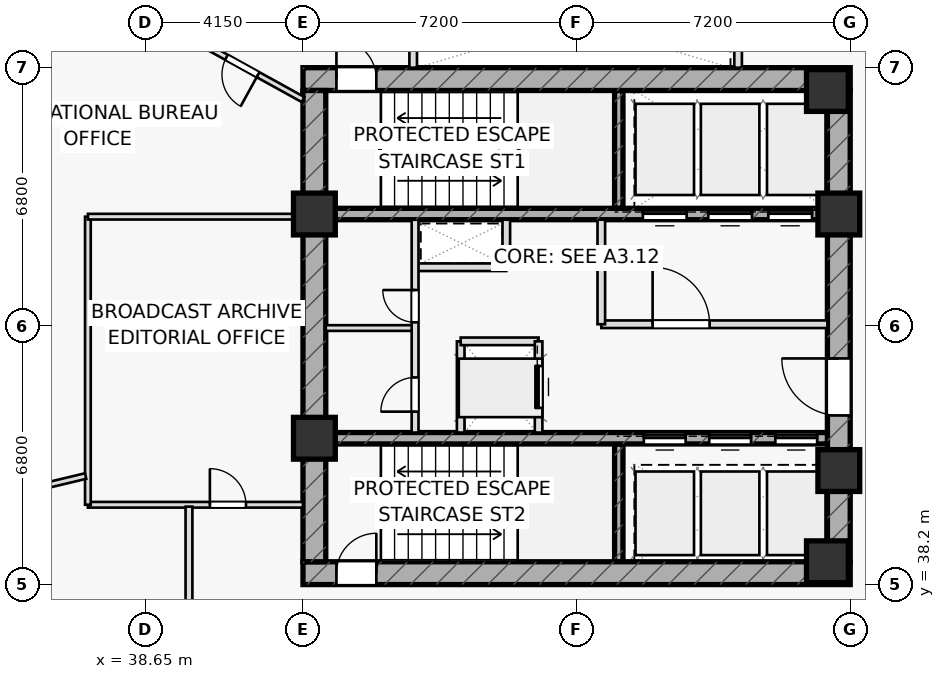
"""IFC4 building model, lengths in metres.
Left out: names, types, materials, properties, quantities, classifications, styles, units other than length and angle.
Written with IfcOpenShell. Run it as: python <this file> out.ifc"""

import sys

from ifc_helpers import new_model, si_unit, direction, frame, frame_2d, origin, origin_2d, place, context, subcontext, project, spatial, rectangle, extrude, element, fill, save


model = new_model("IFC4")
c1 = context("Model", 3, precision=1e-05, world=origin(), true_north=direction((0.0, 1.0)))
c2 = subcontext(c1, "Body", "Model", "MODEL_VIEW")
j1 = project(units=[si_unit("LENGTHUNIT", "METRE"), si_unit("PLANEANGLEUNIT", "RADIAN")], contexts=[c1])
p1 = place(None, origin())
s1 = spatial("IfcSite", under=j1, at=p1, CompositionType="ELEMENT")
p2 = place(p1, origin())
s2 = spatial("IfcBuilding", under=s1, at=p2, CompositionType="ELEMENT")
p3 = place(p2, frame((0.0, 0.0, 127.15)))
s3 = spatial("IfcBuildingStorey", under=s2, at=p3, CompositionType="ELEMENT", Elevation=127.15)
for number, where, z_axis, x_axis in (
    (1, (51.11, 48.1, 0.0), (0.0, 0.0, 1.0), (0.0, 1.0, 0.0)),
    (2, (51.11, 38.8, 0.0), (0.0, 0.0, 1.0), (0.0, 1.0, 0.0)),
):
    element("IfcWall", number, at=place(p3, frame(where, z_axis=z_axis, x_axis=x_axis)), inside=s3, PredefinedType="SHEAR", context=c2, shape_type="SweptSolid", body=[
        extrude(rectangle(XDim=3.1, YDim=0.22, at=frame_2d((1.55, 0.0))), origin(), (0.0, 0.0, 1.0), 3.55),
    ])
p4 = place(p3, frame((42.8, 51.5, 0.0), z_axis=(0.0, 0.0, 1.0), x_axis=(1.0, 0.0, 0.0)))
e3 = element("IfcWall", 3, at=p4, inside=s3, PredefinedType="SHEAR", context=c2, shape_type="SweptSolid", body=[
    extrude(rectangle(XDim=14.4, YDim=0.6, at=frame_2d((7.2, 0.0))), origin(), (0.0, 0.0, 1.0), 3.55),
])
p5 = place(p4, frame((0.88, 0.0, 0.0)))
e4 = element("IfcOpeningElement", 4, at=p5, cuts=e3, PredefinedType="OPENING", context=c2, shape_type="SweptSolid", body=[
    extrude(rectangle(XDim=1.05, YDim=2.2, at=frame_2d((0.525, 1.1))), frame((0.0, 0.31, 0.0), z_axis=(0.0, -1.0, 0.0), x_axis=(1.0, 0.0, 0.0)), (0.0, 0.0, 1.0), 0.62),
])
p6 = place(p3, frame((42.8, 38.5, 0.0), z_axis=(0.0, 0.0, 1.0), x_axis=(1.0, 0.0, 0.0)))
e5 = element("IfcWall", 5, at=p6, inside=s3, PredefinedType="SHEAR", context=c2, shape_type="SweptSolid", body=[
    extrude(rectangle(XDim=14.4, YDim=0.6, at=frame_2d((7.2, 0.0))), origin(), (0.0, 0.0, 1.0), 3.55),
])
p7 = place(p6, frame((0.88, 0.0, 0.0)))
e6 = element("IfcOpeningElement", 6, at=p7, cuts=e5, PredefinedType="OPENING", context=c2, shape_type="SweptSolid", body=[
    extrude(rectangle(XDim=1.05, YDim=2.2, at=frame_2d((0.525, 1.1))), frame((0.0, 0.31, 0.0), z_axis=(0.0, -1.0, 0.0), x_axis=(1.0, 0.0, 0.0)), (0.0, 0.0, 1.0), 0.62),
])
p8 = place(p3, frame((43.1, 38.8, 0.0), z_axis=(0.0, 0.0, 1.0), x_axis=(0.0, 1.0, 0.0)))
e7 = element("IfcWall", 7, at=p8, inside=s3, PredefinedType="SHEAR", context=c2, shape_type="SweptSolid", body=[
    extrude(rectangle(XDim=12.4, YDim=0.6, at=frame_2d((6.2, 0.0))), origin(), (0.0, 0.0, 1.0), 3.55),
])
p9 = place(p3, frame((56.9, 38.8, 0.0), z_axis=(0.0, 0.0, 1.0), x_axis=(0.0, 1.0, 0.0)))
e8 = element("IfcWall", 8, at=p9, inside=s3, PredefinedType="SHEAR", context=c2, shape_type="SweptSolid", body=[
    extrude(rectangle(XDim=12.4, YDim=0.6, at=frame_2d((6.2, 0.0))), origin(), (0.0, 0.0, 1.0), 3.55),
])
p10 = place(p9, frame((3.85, 0.0, 0.0)))
e9 = element("IfcOpeningElement", 9, at=p10, cuts=e8, PredefinedType="OPENING", context=c2, shape_type="SweptSolid", body=[
    extrude(rectangle(XDim=1.5, YDim=2.2, at=frame_2d((0.75, 1.1))), frame((0.0, 0.31, 0.0), z_axis=(0.0, -1.0, 0.0), x_axis=(1.0, 0.0, 0.0)), (0.0, 0.0, 1.0), 0.62),
])
p11 = place(p3, frame((43.4, 47.95, 0.0), z_axis=(0.0, 0.0, 1.0), x_axis=(1.0, 0.0, 0.0)))
e10 = element("IfcWall", 10, at=p11, inside=s3, PredefinedType="SHEAR", context=c2, shape_type="SweptSolid", body=[
    extrude(rectangle(XDim=13.2, YDim=0.3, at=frame_2d((6.6, 0.0))), origin(), (0.0, 0.0, 1.0), 3.55),
])
p12 = place(p11, frame((8.345, 0.0, 0.0)))
e11 = element("IfcOpeningElement", 11, at=p12, cuts=e10, PredefinedType="OPENING", context=c2, shape_type="SweptSolid", body=[
    extrude(rectangle(XDim=1.15, YDim=2.2, at=frame_2d((0.575, 1.1))), frame((0.0, 0.16, 0.0), z_axis=(0.0, -1.0, 0.0), x_axis=(1.0, 0.0, 0.0)), (0.0, 0.0, 1.0), 0.32),
])
p13 = place(p11, frame((10.065, 0.0, 0.0)))
e12 = element("IfcOpeningElement", 12, at=p13, cuts=e10, PredefinedType="OPENING", context=c2, shape_type="SweptSolid", body=[
    extrude(rectangle(XDim=1.15, YDim=2.2, at=frame_2d((0.575, 1.1))), frame((0.0, 0.16, 0.0), z_axis=(0.0, -1.0, 0.0), x_axis=(1.0, 0.0, 0.0)), (0.0, 0.0, 1.0), 0.32),
])
p14 = place(p11, frame((11.645, 0.0, 0.0)))
e13 = element("IfcOpeningElement", 13, at=p14, cuts=e10, PredefinedType="OPENING", context=c2, shape_type="SweptSolid", body=[
    extrude(rectangle(XDim=1.15, YDim=2.2, at=frame_2d((0.575, 1.1))), frame((0.0, 0.16, 0.0), z_axis=(0.0, -1.0, 0.0), x_axis=(1.0, 0.0, 0.0)), (0.0, 0.0, 1.0), 0.32),
])
p15 = place(p3, frame((43.4, 42.05, 0.0), z_axis=(0.0, 0.0, 1.0), x_axis=(1.0, 0.0, 0.0)))
e14 = element("IfcWall", 14, at=p15, inside=s3, PredefinedType="SHEAR", context=c2, shape_type="SweptSolid", body=[
    extrude(rectangle(XDim=13.2, YDim=0.3, at=frame_2d((6.6, 0.0))), origin(), (0.0, 0.0, 1.0), 3.55),
])
p16 = place(p15, frame((8.37, 0.0, 0.0)))
e15 = element("IfcOpeningElement", 15, at=p16, cuts=e14, PredefinedType="OPENING", context=c2, shape_type="SweptSolid", body=[
    extrude(rectangle(XDim=1.1, YDim=2.15, at=frame_2d((0.55, 1.075))), frame((0.0, 0.16, 0.0), z_axis=(0.0, -1.0, 0.0), x_axis=(1.0, 0.0, 0.0)), (0.0, 0.0, 1.0), 0.32),
])
p17 = place(p15, frame((10.09, 0.0, 0.0)))
e16 = element("IfcOpeningElement", 16, at=p17, cuts=e14, PredefinedType="OPENING", context=c2, shape_type="SweptSolid", body=[
    extrude(rectangle(XDim=1.1, YDim=2.15, at=frame_2d((0.55, 1.075))), frame((0.0, 0.16, 0.0), z_axis=(0.0, -1.0, 0.0), x_axis=(1.0, 0.0, 0.0)), (0.0, 0.0, 1.0), 0.32),
])
p18 = place(p15, frame((11.83, 0.0, 0.0)))
e17 = element("IfcOpeningElement", 17, at=p18, cuts=e14, PredefinedType="OPENING", context=c2, shape_type="SweptSolid", body=[
    extrude(rectangle(XDim=1.1, YDim=2.15, at=frame_2d((0.55, 1.075))), frame((0.0, 0.16, 0.0), z_axis=(0.0, -1.0, 0.0), x_axis=(1.0, 0.0, 0.0)), (0.0, 0.0, 1.0), 0.32),
])
for number, where, z_axis, x_axis in (
    (18, (43.1, 47.95, 0.0), (0.0, 0.0, 1.0), (1.0, 0.0, 0.0)),
    (19, (56.9, 47.95, 0.0), (0.0, 0.0, 1.0), (1.0, 0.0, 0.0)),
    (20, (56.6, 51.2, 0.0), (0.0, 0.0, 1.0), (1.0, 0.0, 0.0)),
    (21, (43.1, 42.05, 0.0), (0.0, 0.0, 1.0), (1.0, 0.0, 0.0)),
    (22, (56.9, 41.2, 0.0), (0.0, 0.0, 1.0), (1.0, 0.0, 0.0)),
    (23, (56.6, 38.8, 0.0), (0.0, 0.0, 1.0), (1.0, 0.0, 0.0)),
):
    element("IfcColumn", number, at=place(p3, frame(where, z_axis=z_axis, x_axis=x_axis)), inside=s3, PredefinedType="COLUMN", context=c2, shape_type="SweptSolid", body=[
        extrude(rectangle(XDim=1.1, YDim=1.1, at=origin_2d()), origin(), (0.0, 0.0, 1.0), 3.55),
    ])
for number, where, z_axis, x_axis in (
    (24, (45.7, 51.8, 0.0), (0.0, 0.0, 1.0), (0.0, 1.0, 0.0)),
    (25, (54.25, 51.8, 0.0), (0.0, 0.0, 1.0), (0.0, 1.0, 0.0)),
):
    element("IfcWall", number, at=place(p3, frame(where, z_axis=z_axis, x_axis=x_axis)), inside=s3, PredefinedType="PARTITIONING", context=c2, shape_type="SweptSolid", body=[
        extrude(rectangle(XDim=2.5, YDim=0.2, at=frame_2d((1.25, 0.0))), origin(), (0.0, 0.0, 1.0), 3.55),
    ])
p19 = place(p3, frame((45.75, 46.55, 0.0), z_axis=(0.0, 0.0, 1.0), x_axis=(1.0, 0.0, 0.0)))
e26 = element("IfcWall", 26, at=p19, inside=s3, PredefinedType="PARTITIONING", context=c2, shape_type="SweptSolid", body=[
    extrude(rectangle(XDim=2.4, YDim=0.2, at=frame_2d((1.2, 0.0))), origin(), (0.0, 0.0, 1.0), 3.55),
])
p20 = place(p3, frame((48.15, 46.55, 0.0), z_axis=(0.0, 0.0, 1.0), x_axis=(0.0, 1.0, 0.0)))
e27 = element("IfcWall", 27, at=p20, inside=s3, PredefinedType="PARTITIONING", context=c2, shape_type="SweptSolid", body=[
    extrude(rectangle(XDim=1.25, YDim=0.2, at=frame_2d((0.625, 0.0))), origin(), (0.0, 0.0, 1.0), 3.55),
])
p21 = place(p3, frame((46.95, 42.2, 0.0), z_axis=(0.0, 0.0, 1.0), x_axis=(0.0, 1.0, 0.0)))
e28 = element("IfcWall", 28, at=p21, inside=s3, PredefinedType="PARTITIONING", context=c2, shape_type="SweptSolid", body=[
    extrude(rectangle(XDim=2.4, YDim=0.2, at=frame_2d((1.2, 0.0))), origin(), (0.0, 0.0, 1.0), 3.55),
])
p22 = place(p3, frame((46.95, 44.6, 0.0), z_axis=(0.0, 0.0, 1.0), x_axis=(1.0, 0.0, 0.0)))
e29 = element("IfcWall", 29, at=p22, inside=s3, PredefinedType="PARTITIONING", context=c2, shape_type="SweptSolid", body=[
    extrude(rectangle(XDim=2.05, YDim=0.2, at=frame_2d((1.025, 0.0))), origin(), (0.0, 0.0, 1.0), 3.55),
])
p23 = place(p3, frame((50.65, 45.05, 0.0), z_axis=(0.0, 0.0, 1.0), x_axis=(1.0, 0.0, 0.0)))
e30 = element("IfcWall", 30, at=p23, inside=s3, PredefinedType="PARTITIONING", context=c2, shape_type="SweptSolid", body=[
    extrude(rectangle(XDim=5.95, YDim=0.2, at=frame_2d((2.975, 0.0))), origin(), (0.0, 0.0, 1.0), 3.55),
])
p24 = place(p23, frame((1.35, 0.0, 0.0)))
e31 = element("IfcOpeningElement", 31, at=p24, cuts=e30, PredefinedType="OPENING", context=c2, shape_type="SweptSolid", body=[
    extrude(rectangle(XDim=1.5, YDim=2.2, at=frame_2d((0.75, 1.1))), frame((0.0, 0.11, 0.0), z_axis=(0.0, -1.0, 0.0), x_axis=(1.0, 0.0, 0.0)), (0.0, 0.0, 1.0), 0.22),
])
p25 = place(p3, frame((50.65, 45.05, 0.0), z_axis=(0.0, 0.0, 1.0), x_axis=(0.0, 1.0, 0.0)))
e32 = element("IfcWall", 32, at=p25, inside=s3, PredefinedType="PARTITIONING", context=c2, shape_type="SweptSolid", body=[
    extrude(rectangle(XDim=2.75, YDim=0.2, at=frame_2d((1.375, 0.0))), origin(), (0.0, 0.0, 1.0), 3.55),
])
p26 = place(p3, frame((43.4, 44.95, 0.0), z_axis=(0.0, 0.0, 1.0), x_axis=(1.0, 0.0, 0.0)))
e33 = element("IfcWall", 33, at=p26, inside=s3, PredefinedType="PARTITIONING", context=c2, shape_type="SweptSolid", body=[
    extrude(rectangle(XDim=2.35, YDim=0.15, at=frame_2d((1.175, 0.0))), origin(), (0.0, 0.0, 1.0), 3.55),
])
p27 = place(p3, frame((45.75, 42.2, 0.0), z_axis=(0.0, 0.0, 1.0), x_axis=(0.0, 1.0, 0.0)))
e34 = element("IfcWall", 34, at=p27, inside=s3, PredefinedType="PARTITIONING", context=c2, shape_type="SweptSolid", body=[
    extrude(rectangle(XDim=5.6, YDim=0.18, at=frame_2d((2.8, 0.0))), origin(), (0.0, 0.0, 1.0), 3.55),
])
p28 = place(p27, frame((0.55, 0.0, 0.0)))
e35 = element("IfcOpeningElement", 35, at=p28, cuts=e34, PredefinedType="OPENING", context=c2, shape_type="SweptSolid", body=[
    extrude(rectangle(XDim=0.9, YDim=2.05, at=frame_2d((0.45, 1.025))), frame((0.0, 0.1, 0.0), z_axis=(0.0, -1.0, 0.0), x_axis=(1.0, 0.0, 0.0)), (0.0, 0.0, 1.0), 0.2),
])
p29 = place(p27, frame((2.9, 0.0, 0.0)))
e36 = element("IfcOpeningElement", 36, at=p29, cuts=e34, PredefinedType="OPENING", context=c2, shape_type="SweptSolid", body=[
    extrude(rectangle(XDim=0.85, YDim=2.05, at=frame_2d((0.425, 1.025))), frame((0.0, 0.1, 0.0), z_axis=(0.0, -1.0, 0.0), x_axis=(1.0, 0.0, 0.0)), (0.0, 0.0, 1.0), 0.2),
])
p30 = place(p3, frame((37.14, 40.3, 0.0), z_axis=(0.0, 0.0, 1.0), x_axis=(1.0, 0.0, 0.0)))
e37 = element("IfcWall", 37, at=p30, inside=s3, PredefinedType="PARTITIONING", context=c2, shape_type="SweptSolid", body=[
    extrude(rectangle(XDim=5.66, YDim=0.15, at=frame_2d((2.83, 0.0))), origin(), (0.0, 0.0, 1.0), 3.55),
])
p31 = place(p30, frame((3.21, 0.0, 0.0)))
e38 = element("IfcOpeningElement", 38, at=p31, cuts=e37, PredefinedType="OPENING", context=c2, shape_type="SweptSolid", body=[
    extrude(rectangle(XDim=0.95, YDim=2.05, at=frame_2d((0.475, 1.025))), frame((0.0, 0.085, 0.0), z_axis=(0.0, -1.0, 0.0), x_axis=(1.0, 0.0, 0.0)), (0.0, 0.0, 1.0), 0.17),
])
p32 = place(p3, frame((37.14, 40.3, 0.0), z_axis=(0.0, 0.0, 1.0), x_axis=(0.0, 1.0, 0.0)))
e39 = element("IfcWall", 39, at=p32, inside=s3, PredefinedType="PARTITIONING", context=c2, shape_type="SweptSolid", body=[
    extrude(rectangle(XDim=7.58, YDim=0.15, at=frame_2d((3.79, 0.0))), origin(), (0.0, 0.0, 1.0), 2.835),
])
p33 = place(p3, frame((37.14, 47.88, 0.0), z_axis=(0.0, 0.0, 1.0), x_axis=(1.0, 0.0, 0.0)))
e40 = element("IfcWall", 40, at=p33, inside=s3, PredefinedType="PARTITIONING", context=c2, shape_type="SweptSolid", body=[
    extrude(rectangle(XDim=5.66, YDim=0.15, at=frame_2d((2.83, 0.0))), origin(), (0.0, 0.0, 1.0), 2.835),
])
p34 = place(p3, frame((42.8, 50.963, 0.0), z_axis=(0.0, 0.0, 1.0), x_axis=(-0.875434937419, 0.483335980811, 0.0)))
e41 = element("IfcWall", 41, at=p34, inside=s3, PredefinedType="PARTITIONING", context=c2, shape_type="SweptSolid", body=[
    extrude(rectangle(XDim=12.526, YDim=0.15, at=frame_2d((6.263, 0.0))), origin(), (0.0, 0.0, 1.0), 2.835),
])
p35 = place(p34, frame((1.35, 0.0, 0.0)))
e42 = element("IfcOpeningElement", 42, at=p35, cuts=e41, PredefinedType="OPENING", context=c2, shape_type="SweptSolid", body=[
    extrude(rectangle(XDim=0.95, YDim=2.05, at=frame_2d((0.475, 1.025))), frame((0.0, 0.085, 0.0), z_axis=(0.0, -1.0, 0.0), x_axis=(1.0, 0.0, 0.0)), (0.0, 0.0, 1.0), 0.17),
])
p36 = place(p3, frame((37.08, 41.055, 0.0), z_axis=(0.0, 0.0, 1.0), x_axis=(-0.972658265099, -0.232241037146, 0.0)))
e43 = element("IfcWall", 43, at=p36, inside=s3, PredefinedType="PARTITIONING", context=c2, shape_type="SweptSolid", body=[
    extrude(rectangle(XDim=7.89, YDim=0.15, at=frame_2d((3.945, 0.0))), origin(), (0.0, 0.0, 1.0), 2.975),
])
p37 = place(p36, frame((1.35, 0.0, 0.0)))
e44 = element("IfcOpeningElement", 44, at=p37, cuts=e43, PredefinedType="OPENING", context=c2, shape_type="SweptSolid", body=[
    extrude(rectangle(XDim=0.95, YDim=2.05, at=frame_2d((0.475, 1.025))), frame((0.0, 0.085, 0.0), z_axis=(0.0, -1.0, 0.0), x_axis=(1.0, 0.0, 0.0)), (0.0, 0.0, 1.0), 0.17),
])
p38 = place(p3, frame((39.8, 35.95, 0.0), z_axis=(0.0, 0.0, 1.0), x_axis=(0.0, 1.0, 0.0)))
e45 = element("IfcWall", 45, at=p38, inside=s3, PredefinedType="PARTITIONING", context=c2, shape_type="SweptSolid", body=[
    extrude(rectangle(XDim=4.3, YDim=0.18, at=frame_2d((2.15, 0.0))), origin(), (0.0, 0.0, 1.0), 2.835),
])
p39 = place(p3, frame((49.0, 42.2, 0.0), z_axis=(0.0, 0.0, 1.0), x_axis=(0.0, 1.0, 0.0)))
e46 = element("IfcWall", 46, at=p39, inside=s3, PredefinedType="PARTITIONING", context=c2, shape_type="SweptSolid", body=[
    extrude(rectangle(XDim=2.4, YDim=0.2, at=frame_2d((1.2, 0.0))), origin(), (0.0, 0.0, 1.0), 3.55),
])
p40 = place(p39, frame((0.65, 0.0, 0.0)))
e47 = element("IfcOpeningElement", 47, at=p40, cuts=e46, PredefinedType="OPENING", context=c2, shape_type="SweptSolid", body=[
    extrude(rectangle(XDim=1.1, YDim=2.15, at=frame_2d((0.55, 1.075))), frame((0.0, 0.11, 0.0), z_axis=(0.0, -1.0, 0.0), x_axis=(1.0, 0.0, 0.0)), (0.0, 0.0, 1.0), 0.22),
])
p41 = place(p5, origin())
e48 = element("IfcDoor", 48, at=p41, inside=s3, OperationType="SINGLE_SWING_LEFT", PredefinedType="DOOR", context=c2, shape_type="SweptSolid", body=[
    extrude(rectangle(XDim=1.05, YDim=2.2, at=frame_2d((0.525, 1.1))), frame((0.0, 0.025, 0.0), z_axis=(0.0, -1.0, 0.0), x_axis=(1.0, 0.0, 0.0)), (0.0, 0.0, 1.0), 0.05),
])
fill(e4, e48)
p42 = place(p7, origin())
e49 = element("IfcDoor", 49, at=p42, inside=s3, OperationType="SINGLE_SWING_RIGHT", PredefinedType="DOOR", context=c2, shape_type="SweptSolid", body=[
    extrude(rectangle(XDim=1.05, YDim=2.2, at=frame_2d((0.525, 1.1))), frame((0.0, 0.025, 0.0), z_axis=(0.0, -1.0, 0.0), x_axis=(1.0, 0.0, 0.0)), (0.0, 0.0, 1.0), 0.05),
])
fill(e6, e49)
p43 = place(p10, origin())
e50 = element("IfcDoor", 50, at=p43, inside=s3, OperationType="SINGLE_SWING_RIGHT", PredefinedType="DOOR", context=c2, shape_type="SweptSolid", body=[
    extrude(rectangle(XDim=1.5, YDim=2.2, at=frame_2d((0.75, 1.1))), frame((0.0, 0.025, 0.0), z_axis=(0.0, -1.0, 0.0), x_axis=(1.0, 0.0, 0.0)), (0.0, 0.0, 1.0), 0.05),
])
fill(e9, e50)
p44 = place(p24, origin())
e51 = element("IfcDoor", 51, at=p44, inside=s3, OperationType="SINGLE_SWING_LEFT", PredefinedType="DOOR", context=c2, shape_type="SweptSolid", body=[
    extrude(rectangle(XDim=1.5, YDim=2.2, at=frame_2d((0.75, 1.1))), frame((0.0, 0.025, 0.0), z_axis=(0.0, -1.0, 0.0), x_axis=(1.0, 0.0, 0.0)), (0.0, 0.0, 1.0), 0.05),
])
fill(e31, e51)
p45 = place(p28, origin())
e52 = element("IfcDoor", 52, at=p45, inside=s3, OperationType="SINGLE_SWING_LEFT", PredefinedType="DOOR", context=c2, shape_type="SweptSolid", body=[
    extrude(rectangle(XDim=0.9, YDim=2.05, at=frame_2d((0.45, 1.025))), frame((0.0, 0.025, 0.0), z_axis=(0.0, -1.0, 0.0), x_axis=(1.0, 0.0, 0.0)), (0.0, 0.0, 1.0), 0.05),
])
fill(e35, e52)
p46 = place(p29, origin())
e53 = element("IfcDoor", 53, at=p46, inside=s3, OperationType="SINGLE_SWING_RIGHT", PredefinedType="DOOR", context=c2, shape_type="SweptSolid", body=[
    extrude(rectangle(XDim=0.85, YDim=2.05, at=frame_2d((0.425, 1.025))), frame((0.0, 0.025, 0.0), z_axis=(0.0, -1.0, 0.0), x_axis=(1.0, 0.0, 0.0)), (0.0, 0.0, 1.0), 0.05),
])
fill(e36, e53)
p47 = place(p31, origin())
e54 = element("IfcDoor", 54, at=p47, inside=s3, OperationType="SINGLE_SWING_LEFT", PredefinedType="DOOR", context=c2, shape_type="SweptSolid", body=[
    extrude(rectangle(XDim=0.95, YDim=2.05, at=frame_2d((0.475, 1.025))), frame((0.0, 0.025, 0.0), z_axis=(0.0, -1.0, 0.0), x_axis=(1.0, 0.0, 0.0)), (0.0, 0.0, 1.0), 0.05),
])
fill(e38, e54)
p48 = place(p35, origin())
e55 = element("IfcDoor", 55, at=p48, inside=s3, OperationType="SINGLE_SWING_LEFT", PredefinedType="DOOR", context=c2, shape_type="SweptSolid", body=[
    extrude(rectangle(XDim=0.95, YDim=2.05, at=frame_2d((0.475, 1.025))), frame((0.0, 0.025, 0.0), z_axis=(0.0, -1.0, 0.0), x_axis=(1.0, 0.0, 0.0)), (0.0, 0.0, 1.0), 0.05),
])
fill(e42, e55)
p49 = place(p12, origin())
e56 = element("IfcDoor", 56, at=p49, inside=s3, OperationType="SLIDING_TO_LEFT", PredefinedType="DOOR", context=c2, shape_type="SweptSolid", body=[
    extrude(rectangle(XDim=1.15, YDim=2.2, at=frame_2d((0.575, 1.1))), frame((0.0, 0.025, 0.0), z_axis=(0.0, -1.0, 0.0), x_axis=(1.0, 0.0, 0.0)), (0.0, 0.0, 1.0), 0.05),
])
fill(e11, e56)
p50 = place(p13, origin())
e57 = element("IfcDoor", 57, at=p50, inside=s3, OperationType="SLIDING_TO_LEFT", PredefinedType="DOOR", context=c2, shape_type="SweptSolid", body=[
    extrude(rectangle(XDim=1.15, YDim=2.2, at=frame_2d((0.575, 1.1))), frame((0.0, 0.025, 0.0), z_axis=(0.0, -1.0, 0.0), x_axis=(1.0, 0.0, 0.0)), (0.0, 0.0, 1.0), 0.05),
])
fill(e12, e57)
p51 = place(p14, origin())
e58 = element("IfcDoor", 58, at=p51, inside=s3, OperationType="SLIDING_TO_LEFT", PredefinedType="DOOR", context=c2, shape_type="SweptSolid", body=[
    extrude(rectangle(XDim=1.15, YDim=2.2, at=frame_2d((0.575, 1.1))), frame((0.0, 0.025, 0.0), z_axis=(0.0, -1.0, 0.0), x_axis=(1.0, 0.0, 0.0)), (0.0, 0.0, 1.0), 0.05),
])
fill(e13, e58)
p52 = place(p16, origin())
e59 = element("IfcDoor", 59, at=p52, inside=s3, OperationType="SLIDING_TO_LEFT", PredefinedType="DOOR", context=c2, shape_type="SweptSolid", body=[
    extrude(rectangle(XDim=1.1, YDim=2.15, at=frame_2d((0.55, 1.075))), frame((0.0, 0.025, 0.0), z_axis=(0.0, -1.0, 0.0), x_axis=(1.0, 0.0, 0.0)), (0.0, 0.0, 1.0), 0.05),
])
fill(e15, e59)
p53 = place(p17, origin())
e60 = element("IfcDoor", 60, at=p53, inside=s3, OperationType="SLIDING_TO_LEFT", PredefinedType="DOOR", context=c2, shape_type="SweptSolid", body=[
    extrude(rectangle(XDim=1.1, YDim=2.15, at=frame_2d((0.55, 1.075))), frame((0.0, 0.025, 0.0), z_axis=(0.0, -1.0, 0.0), x_axis=(1.0, 0.0, 0.0)), (0.0, 0.0, 1.0), 0.05),
])
fill(e16, e60)
p54 = place(p18, origin())
e61 = element("IfcDoor", 61, at=p54, inside=s3, OperationType="SLIDING_TO_LEFT", PredefinedType="DOOR", context=c2, shape_type="SweptSolid", body=[
    extrude(rectangle(XDim=1.1, YDim=2.15, at=frame_2d((0.55, 1.075))), frame((0.0, 0.025, 0.0), z_axis=(0.0, -1.0, 0.0), x_axis=(1.0, 0.0, 0.0)), (0.0, 0.0, 1.0), 0.05),
])
fill(e17, e61)
p55 = place(p40, origin())
e62 = element("IfcDoor", 62, at=p55, inside=s3, OperationType="SLIDING_TO_RIGHT", PredefinedType="DOOR", context=c2, shape_type="SweptSolid", body=[
    extrude(rectangle(XDim=1.1, YDim=2.15, at=frame_2d((0.55, 1.075))), frame((0.0, 0.025, 0.0), z_axis=(0.0, -1.0, 0.0), x_axis=(1.0, 0.0, 0.0)), (0.0, 0.0, 1.0), 0.05),
])
fill(e47, e62)
save(model, sys.argv[1])
